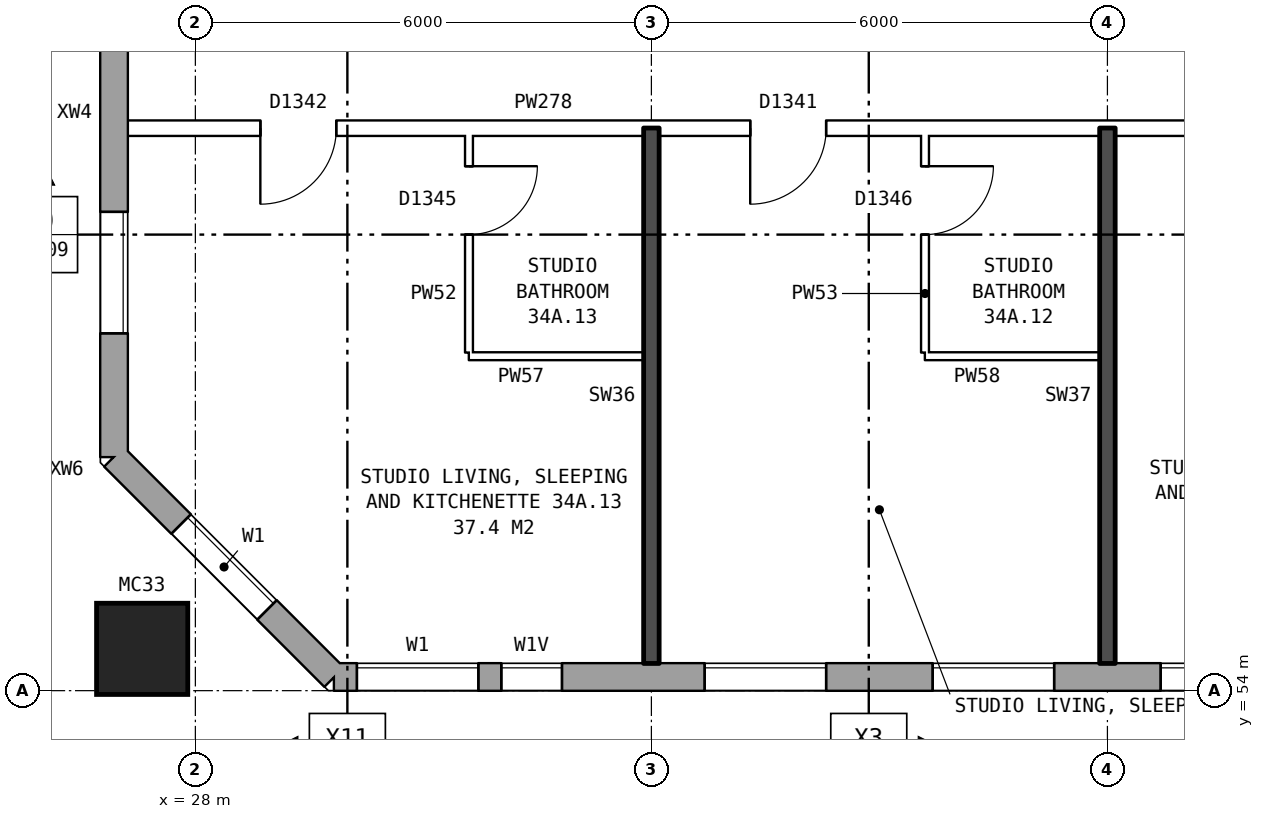
"""IFC4 building model, lengths in metres.
Left out: names, types, materials, properties, quantities, classifications, styles, units other than length and angle.
Written with IfcOpenShell. Run it as: python <this file> out.ifc"""

import sys

from ifc_helpers import new_model, si_unit, direction, frame, frame_2d, origin, origin_2d, place, context, subcontext, project, spatial, rectangle, hollow_rectangle, extrude, element, fill, save


model = new_model("IFC4")
c1 = context("Model", 3, precision=1e-05, world=origin(), true_north=direction((0.0, 1.0)))
c2 = subcontext(c1, "Body", "Model", "MODEL_VIEW")
j1 = project(units=[si_unit("LENGTHUNIT", "METRE"), si_unit("PLANEANGLEUNIT", "RADIAN")], contexts=[c1])
p1 = place(None, origin())
s1 = spatial("IfcSite", under=j1, at=p1, CompositionType="ELEMENT")
p2 = place(p1, origin())
s2 = spatial("IfcBuilding", under=s1, at=p2, CompositionType="ELEMENT")
p3 = place(p2, frame((0.0, 0.0, 123.7)))
s3 = spatial("IfcBuildingStorey", under=s2, at=p3, CompositionType="ELEMENT", Elevation=123.7)
p4 = place(p3, frame((27.3, 54.55, 0.0), z_axis=(0.0, 0.0, 1.0), x_axis=(1.0, 0.0, 0.0)))
e1 = element("IfcColumn", 1, at=p4, inside=s3, PredefinedType="COLUMN", context=c2, shape_type="SweptSolid", body=[
    extrude(hollow_rectangle(XDim=1.2, YDim=1.2, WallThickness=0.065, at=origin_2d()), origin(), (0.0, 0.0, 1.0), 3.1),
])
p5 = place(p3, frame((26.93, 57.075, 0.0), z_axis=(0.0, 0.0, 1.0), x_axis=(0.707106781187, -0.707106781187, 0.0)))
e2 = element("IfcWall", 2, at=p5, inside=s3, PredefinedType="STANDARD", context=c2, shape_type="SweptSolid", body=[
    extrude(rectangle(XDim=4.094, YDim=0.36, at=frame_2d((2.047, 0.0))), origin(), (0.0, 0.0, 1.0), 2.85),
])
p6 = place(p5, frame((1.247, 0.0, 0.8)))
e3 = element("IfcOpeningElement", 3, at=p6, cuts=e2, PredefinedType="OPENING", context=c2, shape_type="SweptSolid", body=[
    extrude(rectangle(XDim=1.6, YDim=1.8, at=frame_2d((0.8, 0.9))), frame((0.0, 0.19, 0.0), z_axis=(0.0, -1.0, 0.0), x_axis=(1.0, 0.0, 0.0)), (0.0, 0.0, 1.0), 0.38),
])
p7 = place(p3, frame((29.825, 54.18, 0.0), z_axis=(0.0, 0.0, 1.0), x_axis=(1.0, 0.0, 0.0)))
e4 = element("IfcWall", 4, at=p7, inside=s3, PredefinedType="STANDARD", context=c2, shape_type="SweptSolid", body=[
    extrude(rectangle(XDim=43.101, YDim=0.36, at=frame_2d((21.55, 0.0))), origin(), (0.0, 0.0, 1.0), 2.85),
])
p8 = place(p7, frame((0.3, 0.0, 0.8)))
e5 = element("IfcOpeningElement", 5, at=p8, cuts=e4, PredefinedType="OPENING", context=c2, shape_type="SweptSolid", body=[
    extrude(rectangle(XDim=1.6, YDim=1.8, at=frame_2d((0.8, 0.9))), frame((0.0, 0.19, 0.0), z_axis=(0.0, -1.0, 0.0), x_axis=(1.0, 0.0, 0.0)), (0.0, 0.0, 1.0), 0.38),
])
p9 = place(p7, frame((4.875, 0.0, 0.8)))
e6 = element("IfcOpeningElement", 6, at=p9, cuts=e4, PredefinedType="OPENING", context=c2, shape_type="SweptSolid", body=[
    extrude(rectangle(XDim=1.6, YDim=1.8, at=frame_2d((0.8, 0.9))), frame((0.0, 0.19, 0.0), z_axis=(0.0, -1.0, 0.0), x_axis=(1.0, 0.0, 0.0)), (0.0, 0.0, 1.0), 0.38),
])
p10 = place(p7, frame((7.875, 0.0, 0.8)))
e7 = element("IfcOpeningElement", 7, at=p10, cuts=e4, PredefinedType="OPENING", context=c2, shape_type="SweptSolid", body=[
    extrude(rectangle(XDim=1.6, YDim=1.8, at=frame_2d((0.8, 0.9))), frame((0.0, 0.19, 0.0), z_axis=(0.0, -1.0, 0.0), x_axis=(1.0, 0.0, 0.0)), (0.0, 0.0, 1.0), 0.38),
])
p11 = place(p7, frame((10.875, 0.0, 0.8)))
e8 = element("IfcOpeningElement", 8, at=p11, cuts=e4, PredefinedType="OPENING", context=c2, shape_type="SweptSolid", body=[
    extrude(rectangle(XDim=1.6, YDim=1.8, at=frame_2d((0.8, 0.9))), frame((0.0, 0.19, 0.0), z_axis=(0.0, -1.0, 0.0), x_axis=(1.0, 0.0, 0.0)), (0.0, 0.0, 1.0), 0.38),
])
p12 = place(p7, frame((13.875, 0.0, 0.8)))
e9 = element("IfcOpeningElement", 9, at=p12, cuts=e4, PredefinedType="OPENING", context=c2, shape_type="SweptSolid", body=[
    extrude(rectangle(XDim=1.6, YDim=1.8, at=frame_2d((0.8, 0.9))), frame((0.0, 0.19, 0.0), z_axis=(0.0, -1.0, 0.0), x_axis=(1.0, 0.0, 0.0)), (0.0, 0.0, 1.0), 0.38),
])
p13 = place(p7, frame((16.875, 0.0, 0.8)))
e10 = element("IfcOpeningElement", 10, at=p13, cuts=e4, PredefinedType="OPENING", context=c2, shape_type="SweptSolid", body=[
    extrude(rectangle(XDim=1.6, YDim=1.8, at=frame_2d((0.8, 0.9))), frame((0.0, 0.19, 0.0), z_axis=(0.0, -1.0, 0.0), x_axis=(1.0, 0.0, 0.0)), (0.0, 0.0, 1.0), 0.38),
])
p14 = place(p7, frame((19.875, 0.0, 0.8)))
e11 = element("IfcOpeningElement", 11, at=p14, cuts=e4, PredefinedType="OPENING", context=c2, shape_type="SweptSolid", body=[
    extrude(rectangle(XDim=1.6, YDim=1.8, at=frame_2d((0.8, 0.9))), frame((0.0, 0.19, 0.0), z_axis=(0.0, -1.0, 0.0), x_axis=(1.0, 0.0, 0.0)), (0.0, 0.0, 1.0), 0.38),
])
p15 = place(p7, frame((22.875, 0.0, 0.8)))
e12 = element("IfcOpeningElement", 12, at=p15, cuts=e4, PredefinedType="OPENING", context=c2, shape_type="SweptSolid", body=[
    extrude(rectangle(XDim=1.6, YDim=1.8, at=frame_2d((0.8, 0.9))), frame((0.0, 0.19, 0.0), z_axis=(0.0, -1.0, 0.0), x_axis=(1.0, 0.0, 0.0)), (0.0, 0.0, 1.0), 0.38),
])
p16 = place(p7, frame((25.875, 0.0, 0.8)))
e13 = element("IfcOpeningElement", 13, at=p16, cuts=e4, PredefinedType="OPENING", context=c2, shape_type="SweptSolid", body=[
    extrude(rectangle(XDim=1.6, YDim=1.8, at=frame_2d((0.8, 0.9))), frame((0.0, 0.19, 0.0), z_axis=(0.0, -1.0, 0.0), x_axis=(1.0, 0.0, 0.0)), (0.0, 0.0, 1.0), 0.38),
])
p17 = place(p7, frame((28.875, 0.0, 0.8)))
e14 = element("IfcOpeningElement", 14, at=p17, cuts=e4, PredefinedType="OPENING", context=c2, shape_type="SweptSolid", body=[
    extrude(rectangle(XDim=1.6, YDim=1.8, at=frame_2d((0.8, 0.9))), frame((0.0, 0.19, 0.0), z_axis=(0.0, -1.0, 0.0), x_axis=(1.0, 0.0, 0.0)), (0.0, 0.0, 1.0), 0.38),
])
p18 = place(p7, frame((31.875, 0.0, 0.8)))
e15 = element("IfcOpeningElement", 15, at=p18, cuts=e4, PredefinedType="OPENING", context=c2, shape_type="SweptSolid", body=[
    extrude(rectangle(XDim=1.6, YDim=1.8, at=frame_2d((0.8, 0.9))), frame((0.0, 0.19, 0.0), z_axis=(0.0, -1.0, 0.0), x_axis=(1.0, 0.0, 0.0)), (0.0, 0.0, 1.0), 0.38),
])
p19 = place(p7, frame((34.875, 0.0, 0.8)))
e16 = element("IfcOpeningElement", 16, at=p19, cuts=e4, PredefinedType="OPENING", context=c2, shape_type="SweptSolid", body=[
    extrude(rectangle(XDim=1.6, YDim=1.8, at=frame_2d((0.8, 0.9))), frame((0.0, 0.19, 0.0), z_axis=(0.0, -1.0, 0.0), x_axis=(1.0, 0.0, 0.0)), (0.0, 0.0, 1.0), 0.38),
])
p20 = place(p7, frame((36.775, 0.0, 0.8)))
e17 = element("IfcOpeningElement", 17, at=p20, cuts=e4, PredefinedType="OPENING", context=c2, shape_type="SweptSolid", body=[
    extrude(rectangle(XDim=1.2, YDim=1.8, at=frame_2d((0.6, 0.9))), frame((0.0, 0.19, 0.0), z_axis=(0.0, -1.0, 0.0), x_axis=(1.0, 0.0, 0.0)), (0.0, 0.0, 1.0), 0.38),
])
p21 = place(p7, frame((40.875, 0.0, 0.8)))
e18 = element("IfcOpeningElement", 18, at=p21, cuts=e4, PredefinedType="OPENING", context=c2, shape_type="SweptSolid", body=[
    extrude(rectangle(XDim=1.6, YDim=1.8, at=frame_2d((0.8, 0.9))), frame((0.0, 0.19, 0.0), z_axis=(0.0, -1.0, 0.0), x_axis=(1.0, 0.0, 0.0)), (0.0, 0.0, 1.0), 0.38),
])
p22 = place(p7, frame((2.2, 0.0, 1.7)))
e19 = element("IfcOpeningElement", 19, at=p22, cuts=e4, PredefinedType="OPENING", context=c2, shape_type="SweptSolid", body=[
    extrude(rectangle(XDim=0.8, YDim=0.9, at=frame_2d((0.4, 0.45))), frame((0.0, 0.19, 0.0), z_axis=(0.0, -1.0, 0.0), x_axis=(1.0, 0.0, 0.0)), (0.0, 0.0, 1.0), 0.38),
])
p23 = place(p7, frame((38.275, 0.0, 0.8)))
e20 = element("IfcOpeningElement", 20, at=p23, cuts=e4, PredefinedType="OPENING", context=c2, shape_type="SweptSolid", body=[
    extrude(rectangle(XDim=0.6, YDim=0.9, at=frame_2d((0.3, 0.45))), frame((0.0, 0.19, 0.0), z_axis=(0.0, -1.0, 0.0), x_axis=(1.0, 0.0, 0.0)), (0.0, 0.0, 1.0), 0.38),
])
p24 = place(p3, frame((26.93, 82.925, 0.0), z_axis=(0.0, 0.0, 1.0), x_axis=(0.0, -1.0, 0.0)))
e21 = element("IfcWall", 21, at=p24, inside=s3, PredefinedType="STANDARD", context=c2, shape_type="SweptSolid", body=[
    extrude(rectangle(XDim=25.851, YDim=0.36, at=frame_2d((12.925, 0.0))), origin(), (0.0, 0.0, 1.0), 2.85),
])
p25 = place(p24, frame((1.625, 0.0, 0.8)))
e22 = element("IfcOpeningElement", 22, at=p25, cuts=e21, PredefinedType="OPENING", context=c2, shape_type="SweptSolid", body=[
    extrude(rectangle(XDim=1.6, YDim=1.8, at=frame_2d((0.8, 0.9))), frame((0.0, 0.19, 0.0), z_axis=(0.0, -1.0, 0.0), x_axis=(1.0, 0.0, 0.0)), (0.0, 0.0, 1.0), 0.38),
])
p26 = place(p24, frame((5.775, 0.0, 0.8)))
e23 = element("IfcOpeningElement", 23, at=p26, cuts=e21, PredefinedType="OPENING", context=c2, shape_type="SweptSolid", body=[
    extrude(rectangle(XDim=0.6, YDim=0.9, at=frame_2d((0.3, 0.45))), frame((0.0, 0.19, 0.0), z_axis=(0.0, -1.0, 0.0), x_axis=(1.0, 0.0, 0.0)), (0.0, 0.0, 1.0), 0.38),
])
p27 = place(p24, frame((7.625, 0.0, 0.8)))
e24 = element("IfcOpeningElement", 24, at=p27, cuts=e21, PredefinedType="OPENING", context=c2, shape_type="SweptSolid", body=[
    extrude(rectangle(XDim=1.6, YDim=1.8, at=frame_2d((0.8, 0.9))), frame((0.0, 0.19, 0.0), z_axis=(0.0, -1.0, 0.0), x_axis=(1.0, 0.0, 0.0)), (0.0, 0.0, 1.0), 0.38),
])
p28 = place(p24, frame((10.625, 0.0, 0.8)))
e25 = element("IfcOpeningElement", 25, at=p28, cuts=e21, PredefinedType="OPENING", context=c2, shape_type="SweptSolid", body=[
    extrude(rectangle(XDim=1.6, YDim=1.8, at=frame_2d((0.8, 0.9))), frame((0.0, 0.19, 0.0), z_axis=(0.0, -1.0, 0.0), x_axis=(1.0, 0.0, 0.0)), (0.0, 0.0, 1.0), 0.38),
])
p29 = place(p24, frame((13.625, 0.0, 0.8)))
e26 = element("IfcOpeningElement", 26, at=p29, cuts=e21, PredefinedType="OPENING", context=c2, shape_type="SweptSolid", body=[
    extrude(rectangle(XDim=1.6, YDim=1.8, at=frame_2d((0.8, 0.9))), frame((0.0, 0.19, 0.0), z_axis=(0.0, -1.0, 0.0), x_axis=(1.0, 0.0, 0.0)), (0.0, 0.0, 1.0), 0.38),
])
p30 = place(p24, frame((16.625, 0.0, 0.8)))
e27 = element("IfcOpeningElement", 27, at=p30, cuts=e21, PredefinedType="OPENING", context=c2, shape_type="SweptSolid", body=[
    extrude(rectangle(XDim=1.6, YDim=1.8, at=frame_2d((0.8, 0.9))), frame((0.0, 0.19, 0.0), z_axis=(0.0, -1.0, 0.0), x_axis=(1.0, 0.0, 0.0)), (0.0, 0.0, 1.0), 0.38),
])
p31 = place(p24, frame((6.675, 0.0, 0.8)))
e28 = element("IfcOpeningElement", 28, at=p31, cuts=e21, PredefinedType="OPENING", context=c2, shape_type="SweptSolid", body=[
    extrude(rectangle(XDim=0.6, YDim=1.5, at=frame_2d((0.3, 0.75))), frame((0.0, 0.19, 0.0), z_axis=(0.0, -1.0, 0.0), x_axis=(1.0, 0.0, 0.0)), (0.0, 0.0, 1.0), 0.38),
])
p32 = place(p24, frame((22.625, 0.0, 0.8)))
e29 = element("IfcOpeningElement", 29, at=p32, cuts=e21, PredefinedType="OPENING", context=c2, shape_type="SweptSolid", body=[
    extrude(rectangle(XDim=1.6, YDim=1.8, at=frame_2d((0.8, 0.9))), frame((0.0, 0.19, 0.0), z_axis=(0.0, -1.0, 0.0), x_axis=(1.0, 0.0, 0.0)), (0.0, 0.0, 1.0), 0.38),
])
p33 = place(p24, frame((9.525, 0.0, 0.8)))
e30 = element("IfcOpeningElement", 30, at=p33, cuts=e21, PredefinedType="OPENING", context=c2, shape_type="SweptSolid", body=[
    extrude(rectangle(XDim=0.8, YDim=1.8, at=frame_2d((0.4, 0.9))), frame((0.0, 0.19, 0.0), z_axis=(0.0, -1.0, 0.0), x_axis=(1.0, 0.0, 0.0)), (0.0, 0.0, 1.0), 0.38),
])
p34 = place(p24, frame((12.525, 0.0, 0.8)))
e31 = element("IfcOpeningElement", 31, at=p34, cuts=e21, PredefinedType="OPENING", context=c2, shape_type="SweptSolid", body=[
    extrude(rectangle(XDim=0.8, YDim=1.8, at=frame_2d((0.4, 0.9))), frame((0.0, 0.19, 0.0), z_axis=(0.0, -1.0, 0.0), x_axis=(1.0, 0.0, 0.0)), (0.0, 0.0, 1.0), 0.38),
])
p35 = place(p24, frame((15.525, 0.0, 0.8)))
e32 = element("IfcOpeningElement", 32, at=p35, cuts=e21, PredefinedType="OPENING", context=c2, shape_type="SweptSolid", body=[
    extrude(rectangle(XDim=0.8, YDim=1.8, at=frame_2d((0.4, 0.9))), frame((0.0, 0.19, 0.0), z_axis=(0.0, -1.0, 0.0), x_axis=(1.0, 0.0, 0.0)), (0.0, 0.0, 1.0), 0.38),
])
p36 = place(p24, frame((18.525, 0.0, 0.8)))
e33 = element("IfcOpeningElement", 33, at=p36, cuts=e21, PredefinedType="OPENING", context=c2, shape_type="SweptSolid", body=[
    extrude(rectangle(XDim=0.6, YDim=1.5, at=frame_2d((0.3, 0.75))), frame((0.0, 0.19, 0.0), z_axis=(0.0, -1.0, 0.0), x_axis=(1.0, 0.0, 0.0)), (0.0, 0.0, 1.0), 0.38),
])
p37 = place(p24, frame((19.425, 0.0, 0.8)))
e34 = element("IfcOpeningElement", 34, at=p37, cuts=e21, PredefinedType="OPENING", context=c2, shape_type="SweptSolid", body=[
    extrude(rectangle(XDim=0.6, YDim=0.9, at=frame_2d((0.3, 0.45))), frame((0.0, 0.19, 0.0), z_axis=(0.0, -1.0, 0.0), x_axis=(1.0, 0.0, 0.0)), (0.0, 0.0, 1.0), 0.38),
])
for number, where, z_axis, x_axis in (
    (35, (31.6, 58.4, 0.0), (0.0, 0.0, 1.0), (1.0, 0.0, 0.0)),
    (36, (37.6, 58.4, 0.0), (0.0, 0.0, 1.0), (1.0, 0.0, 0.0)),
):
    element("IfcWall", number, at=place(p3, frame(where, z_axis=z_axis, x_axis=x_axis)), inside=s3, PredefinedType="PARTITIONING", context=c2, shape_type="SweptSolid", body=[
        extrude(rectangle(XDim=2.3, YDim=0.1, at=frame_2d((1.15, 0.0))), origin(), (0.0, 0.0, 1.0), 2.85),
    ])
p38 = place(p3, frame((27.11, 61.4, 0.0), z_axis=(0.0, 0.0, 1.0), x_axis=(1.0, 0.0, 0.0)))
e37 = element("IfcWall", 37, at=p38, inside=s3, PredefinedType="PARTITIONING", context=c2, shape_type="SweptSolid", body=[
    extrude(rectangle(XDim=18.79, YDim=0.2, at=frame_2d((9.395, 0.0))), origin(), (0.0, 0.0, 1.0), 2.85),
])
p39 = place(p38, frame((14.19, 0.0, 0.0)))
e38 = element("IfcOpeningElement", 38, at=p39, cuts=e37, PredefinedType="OPENING", context=c2, shape_type="SweptSolid", body=[
    extrude(rectangle(XDim=1.0, YDim=2.1, at=frame_2d((0.5, 1.05))), frame((0.0, 0.11, 0.0), z_axis=(0.0, -1.0, 0.0), x_axis=(1.0, 0.0, 0.0)), (0.0, 0.0, 1.0), 0.22),
])
p40 = place(p38, frame((8.19, 0.0, 0.0)))
e39 = element("IfcOpeningElement", 39, at=p40, cuts=e37, PredefinedType="OPENING", context=c2, shape_type="SweptSolid", body=[
    extrude(rectangle(XDim=1.0, YDim=2.1, at=frame_2d((0.5, 1.05))), frame((0.0, 0.11, 0.0), z_axis=(0.0, -1.0, 0.0), x_axis=(1.0, 0.0, 0.0)), (0.0, 0.0, 1.0), 0.22),
])
p41 = place(p38, frame((1.745, 0.0, 0.0)))
e40 = element("IfcOpeningElement", 40, at=p41, cuts=e37, PredefinedType="OPENING", context=c2, shape_type="SweptSolid", body=[
    extrude(rectangle(XDim=1.0, YDim=2.1, at=frame_2d((0.5, 1.05))), frame((0.0, 0.11, 0.0), z_axis=(0.0, -1.0, 0.0), x_axis=(1.0, 0.0, 0.0)), (0.0, 0.0, 1.0), 0.22),
])
p42 = place(p3, frame((31.6, 58.45, 0.0), z_axis=(0.0, 0.0, 1.0), x_axis=(0.0, 1.0, 0.0)))
e41 = element("IfcWall", 41, at=p42, inside=s3, PredefinedType="PARTITIONING", context=c2, shape_type="SweptSolid", body=[
    extrude(rectangle(XDim=2.85, YDim=0.1, at=frame_2d((1.425, 0.0))), origin(), (0.0, 0.0, 1.0), 2.85),
])
p43 = place(p42, frame((1.55, 0.0, 0.0)))
e42 = element("IfcOpeningElement", 42, at=p43, cuts=e41, PredefinedType="OPENING", context=c2, shape_type="SweptSolid", body=[
    extrude(rectangle(XDim=0.9, YDim=2.1, at=frame_2d((0.45, 1.05))), frame((0.0, 0.06, 0.0), z_axis=(0.0, -1.0, 0.0), x_axis=(1.0, 0.0, 0.0)), (0.0, 0.0, 1.0), 0.12),
])
p44 = place(p3, frame((34.0, 54.36, 0.0), z_axis=(0.0, 0.0, 1.0), x_axis=(0.0, 1.0, 0.0)))
e43 = element("IfcWall", 43, at=p44, inside=s3, PredefinedType="SOLIDWALL", context=c2, shape_type="SweptSolid", body=[
    extrude(rectangle(XDim=7.04, YDim=0.2, at=frame_2d((3.52, 0.0))), origin(), (0.0, 0.0, 1.0), 2.85),
])
p45 = place(p3, frame((37.6, 58.45, 0.0), z_axis=(0.0, 0.0, 1.0), x_axis=(0.0, 1.0, 0.0)))
e44 = element("IfcWall", 44, at=p45, inside=s3, PredefinedType="PARTITIONING", context=c2, shape_type="SweptSolid", body=[
    extrude(rectangle(XDim=2.85, YDim=0.1, at=frame_2d((1.425, 0.0))), origin(), (0.0, 0.0, 1.0), 2.85),
])
p46 = place(p45, frame((1.55, 0.0, 0.0)))
e45 = element("IfcOpeningElement", 45, at=p46, cuts=e44, PredefinedType="OPENING", context=c2, shape_type="SweptSolid", body=[
    extrude(rectangle(XDim=0.9, YDim=2.1, at=frame_2d((0.45, 1.05))), frame((0.0, 0.06, 0.0), z_axis=(0.0, -1.0, 0.0), x_axis=(1.0, 0.0, 0.0)), (0.0, 0.0, 1.0), 0.12),
])
p47 = place(p3, frame((40.0, 54.36, 0.0), z_axis=(0.0, 0.0, 1.0), x_axis=(0.0, 1.0, 0.0)))
e46 = element("IfcWall", 46, at=p47, inside=s3, PredefinedType="SOLIDWALL", context=c2, shape_type="SweptSolid", body=[
    extrude(rectangle(XDim=7.04, YDim=0.2, at=frame_2d((3.52, 0.0))), origin(), (0.0, 0.0, 1.0), 2.85),
])
p48 = place(p6, origin())
e47 = element("IfcWindow", 47, at=p48, inside=s3, PartitioningType="SINGLE_PANEL", PredefinedType="WINDOW", context=c2, shape_type="SweptSolid", body=[
    extrude(rectangle(XDim=1.6, YDim=1.8, at=frame_2d((0.8, 0.9))), frame((0.0, 0.15, 0.0), z_axis=(0.0, -1.0, 0.0), x_axis=(1.0, 0.0, 0.0)), (0.0, 0.0, 1.0), 0.06),
])
fill(e3, e47)
p49 = place(p8, origin())
e48 = element("IfcWindow", 48, at=p49, inside=s3, PartitioningType="SINGLE_PANEL", PredefinedType="WINDOW", context=c2, shape_type="SweptSolid", body=[
    extrude(rectangle(XDim=1.6, YDim=1.8, at=frame_2d((0.8, 0.9))), frame((0.0, 0.15, 0.0), z_axis=(0.0, -1.0, 0.0), x_axis=(1.0, 0.0, 0.0)), (0.0, 0.0, 1.0), 0.06),
])
fill(e5, e48)
p50 = place(p9, origin())
e49 = element("IfcWindow", 49, at=p50, inside=s3, PartitioningType="SINGLE_PANEL", PredefinedType="WINDOW", context=c2, shape_type="SweptSolid", body=[
    extrude(rectangle(XDim=1.6, YDim=1.8, at=frame_2d((0.8, 0.9))), frame((0.0, 0.15, 0.0), z_axis=(0.0, -1.0, 0.0), x_axis=(1.0, 0.0, 0.0)), (0.0, 0.0, 1.0), 0.06),
])
fill(e6, e49)
p51 = place(p10, origin())
e50 = element("IfcWindow", 50, at=p51, inside=s3, PartitioningType="SINGLE_PANEL", PredefinedType="WINDOW", context=c2, shape_type="SweptSolid", body=[
    extrude(rectangle(XDim=1.6, YDim=1.8, at=frame_2d((0.8, 0.9))), frame((0.0, 0.15, 0.0), z_axis=(0.0, -1.0, 0.0), x_axis=(1.0, 0.0, 0.0)), (0.0, 0.0, 1.0), 0.06),
])
fill(e7, e50)
p52 = place(p11, origin())
e51 = element("IfcWindow", 51, at=p52, inside=s3, PartitioningType="SINGLE_PANEL", PredefinedType="WINDOW", context=c2, shape_type="SweptSolid", body=[
    extrude(rectangle(XDim=1.6, YDim=1.8, at=frame_2d((0.8, 0.9))), frame((0.0, 0.15, 0.0), z_axis=(0.0, -1.0, 0.0), x_axis=(1.0, 0.0, 0.0)), (0.0, 0.0, 1.0), 0.06),
])
fill(e8, e51)
p53 = place(p32, origin())
e52 = element("IfcWindow", 52, at=p53, inside=s3, PartitioningType="SINGLE_PANEL", PredefinedType="WINDOW", context=c2, shape_type="SweptSolid", body=[
    extrude(rectangle(XDim=1.6, YDim=1.8, at=frame_2d((0.8, 0.9))), frame((0.0, 0.15, 0.0), z_axis=(0.0, -1.0, 0.0), x_axis=(1.0, 0.0, 0.0)), (0.0, 0.0, 1.0), 0.06),
])
fill(e29, e52)
p54 = place(p40, frame((1.0, 0.0, 0.0), z_axis=(0.0, 0.0, 1.0), x_axis=(-1.0, 0.0, 0.0)))
e53 = element("IfcDoor", 53, at=p54, inside=s3, OperationType="SINGLE_SWING_RIGHT", PredefinedType="DOOR", context=c2, shape_type="SweptSolid", body=[
    extrude(rectangle(XDim=1.0, YDim=2.1, at=frame_2d((0.5, 1.05))), frame((0.0, 0.025, 0.0), z_axis=(0.0, -1.0, 0.0), x_axis=(1.0, 0.0, 0.0)), (0.0, 0.0, 1.0), 0.05),
])
fill(e39, e53)
p55 = place(p46, frame((0.9, 0.0, 0.0), z_axis=(0.0, 0.0, 1.0), x_axis=(-1.0, 0.0, 0.0)))
e54 = element("IfcDoor", 54, at=p55, inside=s3, OperationType="SINGLE_SWING_LEFT", PredefinedType="DOOR", context=c2, shape_type="SweptSolid", body=[
    extrude(rectangle(XDim=0.9, YDim=2.1, at=frame_2d((0.45, 1.05))), frame((0.0, 0.025, 0.0), z_axis=(0.0, -1.0, 0.0), x_axis=(1.0, 0.0, 0.0)), (0.0, 0.0, 1.0), 0.05),
])
fill(e45, e54)
p56 = place(p41, frame((1.0, 0.0, 0.0), z_axis=(0.0, 0.0, 1.0), x_axis=(-1.0, 0.0, 0.0)))
e55 = element("IfcDoor", 55, at=p56, inside=s3, OperationType="SINGLE_SWING_RIGHT", PredefinedType="DOOR", context=c2, shape_type="SweptSolid", body=[
    extrude(rectangle(XDim=1.0, YDim=2.1, at=frame_2d((0.5, 1.05))), frame((0.0, 0.025, 0.0), z_axis=(0.0, -1.0, 0.0), x_axis=(1.0, 0.0, 0.0)), (0.0, 0.0, 1.0), 0.05),
])
fill(e40, e55)
p57 = place(p43, frame((0.9, 0.0, 0.0), z_axis=(0.0, 0.0, 1.0), x_axis=(-1.0, 0.0, 0.0)))
e56 = element("IfcDoor", 56, at=p57, inside=s3, OperationType="SINGLE_SWING_LEFT", PredefinedType="DOOR", context=c2, shape_type="SweptSolid", body=[
    extrude(rectangle(XDim=0.9, YDim=2.1, at=frame_2d((0.45, 1.05))), frame((0.0, 0.025, 0.0), z_axis=(0.0, -1.0, 0.0), x_axis=(1.0, 0.0, 0.0)), (0.0, 0.0, 1.0), 0.05),
])
fill(e42, e56)
p58 = place(p22, origin())
e57 = element("IfcWindow", 57, at=p58, inside=s3, PartitioningType="SINGLE_PANEL", PredefinedType="WINDOW", context=c2, shape_type="SweptSolid", body=[
    extrude(rectangle(XDim=0.8, YDim=0.9, at=frame_2d((0.4, 0.45))), frame((0.0, 0.15, 0.0), z_axis=(0.0, -1.0, 0.0), x_axis=(1.0, 0.0, 0.0)), (0.0, 0.0, 1.0), 0.06),
])
fill(e19, e57)
save(model, sys.argv[1])
